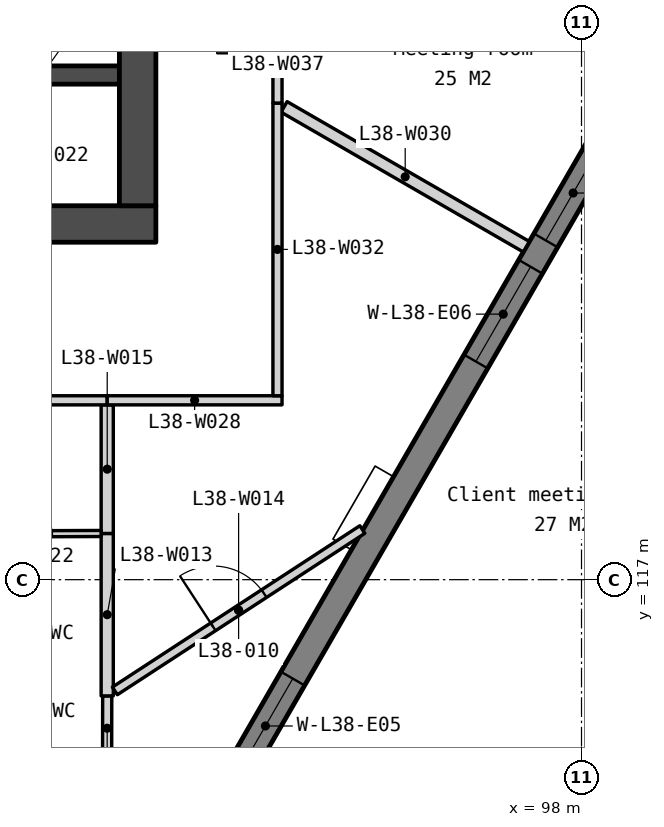
"""IFC4 building model, lengths in metres.
Left out: names, types, materials, properties, quantities, classifications, styles, units other than length and angle.
Written with IfcOpenShell. Run it as: python <this file> out.ifc"""

import sys

from ifc_helpers import new_model, si_unit, direction, frame, frame_2d, origin, place, context, subcontext, project, spatial, polyline, rectangle, outline, extrude, element, fill, save


model = new_model("IFC4")
c1 = context("Model", 3, precision=1e-05, world=origin(), true_north=direction((0.0, 1.0)))
c2 = subcontext(c1, "Body", "Model", "MODEL_VIEW")
j1 = project(units=[si_unit("LENGTHUNIT", "METRE"), si_unit("PLANEANGLEUNIT", "RADIAN")], contexts=[c1])
p1 = place(None, origin())
s1 = spatial("IfcSite", under=j1, at=p1, CompositionType="ELEMENT")
p2 = place(p1, origin())
s2 = spatial("IfcBuilding", under=s1, at=p2, CompositionType="ELEMENT")
p3 = place(p2, frame((0.0, 0.0, 152.0)))
s3 = spatial("IfcBuildingStorey", under=s2, at=p3, CompositionType="ELEMENT", Elevation=152.0)
p4 = place(p3, frame((69.0, 122.85, 0.0), z_axis=(0.0, 0.0, 1.0), x_axis=(1.0, 0.0, 0.0)))
e1 = element("IfcWall", 1, at=p4, inside=s3, PredefinedType="SOLIDWALL", context=c2, shape_type="SweptSolid", body=[
    extrude(rectangle(XDim=22.0, YDim=0.6, at=frame_2d((11.0, 0.0))), origin(), (0.0, 0.0, 1.0), 3.75),
])
p5 = place(p4, frame((16.375, 0.0, 0.0)))
e2 = element("IfcOpeningElement", 2, at=p5, cuts=e1, PredefinedType="OPENING", context=c2, shape_type="SweptSolid", body=[
    extrude(rectangle(XDim=1.8, YDim=2.1, at=frame_2d((0.9, 1.05))), frame((0.0, 0.31, 0.0), z_axis=(0.0, -1.0, 0.0), x_axis=(1.0, 0.0, 0.0)), (0.0, 0.0, 1.0), 0.62),
])
p6 = place(p4, frame((3.825, 0.0, 0.0)))
e3 = element("IfcOpeningElement", 3, at=p6, cuts=e1, PredefinedType="OPENING", context=c2, shape_type="SweptSolid", body=[
    extrude(rectangle(XDim=1.8, YDim=2.1, at=frame_2d((0.9, 1.05))), frame((0.0, 0.31, 0.0), z_axis=(0.0, -1.0, 0.0), x_axis=(1.0, 0.0, 0.0)), (0.0, 0.0, 1.0), 0.62),
])
p7 = place(p4, frame((12.85, 0.0, 0.0)))
e4 = element("IfcOpeningElement", 4, at=p7, cuts=e1, PredefinedType="OPENING", context=c2, shape_type="SweptSolid", body=[
    extrude(rectangle(XDim=1.5, YDim=2.1, at=frame_2d((0.75, 1.05))), frame((0.0, 0.31, 0.0), z_axis=(0.0, -1.0, 0.0), x_axis=(1.0, 0.0, 0.0)), (0.0, 0.0, 1.0), 0.62),
])
p8 = place(p3, frame((87.85, 125.3, 0.0), z_axis=(0.0, 0.0, 1.0), x_axis=(1.0, 0.0, 0.0)))
e5 = element("IfcWall", 5, at=p8, inside=s3, PredefinedType="SOLIDWALL", context=c2, shape_type="SweptSolid", body=[
    extrude(rectangle(XDim=2.55, YDim=0.3, at=frame_2d((1.275, 0.0))), origin(), (0.0, 0.0, 1.0), 3.75),
])
p9 = place(p3, frame((90.7, 133.95, 0.0), z_axis=(0.0, 0.0, 1.0), x_axis=(0.0, -1.0, 0.0)))
e6 = element("IfcWall", 6, at=p9, inside=s3, PredefinedType="SOLIDWALL", context=c2, shape_type="SweptSolid", body=[
    extrude(rectangle(XDim=10.8, YDim=0.6, at=frame_2d((5.4, 0.0))), origin(), (0.0, 0.0, 1.0), 3.75),
])
p10 = place(p3, frame((82.105, 96.067, -0.15), z_axis=(0.0, 0.0, 1.0), x_axis=(0.499997369791, 0.866026922331, 0.0)))
e7 = element("IfcWall", 7, at=p10, inside=s3, PredefinedType="SOLIDWALL", context=c2, shape_type="SweptSolid", body=[
    extrude(outline(polyline([(40.486, 0.0), (40.486, 3.9), (0.0, 3.9), (0.0, 0.0), (40.486, 0.0)])), frame((0.0, 0.225, 0.0), z_axis=(0.0, -1.0, 0.0), x_axis=(1.0, 0.0, 0.0)), (0.0, 0.0, 1.0), 0.45),
])
p11 = place(p10, frame((0.87, 0.0, 0.95)))
e8 = element("IfcOpeningElement", 8, at=p11, cuts=e7, PredefinedType="OPENING", context=c2, shape_type="SweptSolid", body=[
    extrude(rectangle(XDim=1.2, YDim=2.2, at=frame_2d((0.6, 1.1))), frame((0.0, 0.235, 0.0), z_axis=(0.0, -1.0, 0.0), x_axis=(1.0, 0.0, 0.0)), (0.0, 0.0, 1.0), 0.47),
])
p12 = place(p10, frame((8.072, 0.0, 0.95)))
e9 = element("IfcOpeningElement", 9, at=p12, cuts=e7, PredefinedType="OPENING", context=c2, shape_type="SweptSolid", body=[
    extrude(rectangle(XDim=1.8, YDim=2.2, at=frame_2d((0.9, 1.1))), frame((0.0, 0.235, 0.0), z_axis=(0.0, -1.0, 0.0), x_axis=(1.0, 0.0, 0.0)), (0.0, 0.0, 1.0), 0.47),
])
p13 = place(p10, frame((10.372, 0.0, 0.95)))
e10 = element("IfcOpeningElement", 10, at=p13, cuts=e7, PredefinedType="OPENING", context=c2, shape_type="SweptSolid", body=[
    extrude(rectangle(XDim=1.8, YDim=2.2, at=frame_2d((0.9, 1.1))), frame((0.0, 0.235, 0.0), z_axis=(0.0, -1.0, 0.0), x_axis=(1.0, 0.0, 0.0)), (0.0, 0.0, 1.0), 0.47),
])
p14 = place(p10, frame((18.193, 0.0, 0.95)))
e11 = element("IfcOpeningElement", 11, at=p14, cuts=e7, PredefinedType="OPENING", context=c2, shape_type="SweptSolid", body=[
    extrude(rectangle(XDim=1.8, YDim=2.2, at=frame_2d((0.9, 1.1))), frame((0.0, 0.235, 0.0), z_axis=(0.0, -1.0, 0.0), x_axis=(1.0, 0.0, 0.0)), (0.0, 0.0, 1.0), 0.47),
])
p15 = place(p10, frame((20.493, 0.0, 0.95)))
e12 = element("IfcOpeningElement", 12, at=p15, cuts=e7, PredefinedType="OPENING", context=c2, shape_type="SweptSolid", body=[
    extrude(rectangle(XDim=1.8, YDim=2.2, at=frame_2d((0.9, 1.1))), frame((0.0, 0.235, 0.0), z_axis=(0.0, -1.0, 0.0), x_axis=(1.0, 0.0, 0.0)), (0.0, 0.0, 1.0), 0.47),
])
p16 = place(p10, frame((28.315, 0.0, 0.95)))
e13 = element("IfcOpeningElement", 13, at=p16, cuts=e7, PredefinedType="OPENING", context=c2, shape_type="SweptSolid", body=[
    extrude(rectangle(XDim=1.8, YDim=2.2, at=frame_2d((0.9, 1.1))), frame((0.0, 0.235, 0.0), z_axis=(0.0, -1.0, 0.0), x_axis=(1.0, 0.0, 0.0)), (0.0, 0.0, 1.0), 0.47),
])
p17 = place(p10, frame((30.615, 0.0, 0.95)))
e14 = element("IfcOpeningElement", 14, at=p17, cuts=e7, PredefinedType="OPENING", context=c2, shape_type="SweptSolid", body=[
    extrude(rectangle(XDim=1.8, YDim=2.2, at=frame_2d((0.9, 1.1))), frame((0.0, 0.235, 0.0), z_axis=(0.0, -1.0, 0.0), x_axis=(1.0, 0.0, 0.0)), (0.0, 0.0, 1.0), 0.47),
])
p18 = place(p10, frame((38.417, 0.0, 0.95)))
e15 = element("IfcOpeningElement", 15, at=p18, cuts=e7, PredefinedType="OPENING", context=c2, shape_type="SweptSolid", body=[
    extrude(rectangle(XDim=1.2, YDim=2.2, at=frame_2d((0.6, 1.1))), frame((0.0, 0.235, 0.0), z_axis=(0.0, -1.0, 0.0), x_axis=(1.0, 0.0, 0.0)), (0.0, 0.0, 1.0), 0.47),
])
p19 = place(p3, frame((90.198, 114.025, 0.0), z_axis=(0.0, 0.0, 1.0), x_axis=(0.001606976805, 0.999998708812, 0.0)))
e16 = element("IfcWall", 16, at=p19, inside=s3, PredefinedType="PARTITIONING", context=c2, shape_type="SweptSolid", body=[
    extrude(rectangle(XDim=1.063, YDim=0.15, at=frame_2d((0.532, 0.0))), origin(), (0.0, 0.0, 1.0), 3.75),
])
p20 = place(p3, frame((90.2, 115.088, 0.0), z_axis=(0.0, 0.0, 1.0), x_axis=(0.0, 1.0, 0.0)))
e17 = element("IfcWall", 17, at=p20, inside=s3, PredefinedType="PARTITIONING", context=c2, shape_type="SweptSolid", body=[
    extrude(rectangle(XDim=2.672, YDim=0.2, at=frame_2d((1.336, 0.0))), origin(), (0.0, 0.0, 1.0), 3.75),
])
p21 = place(p3, frame((90.326, 115.17, 0.0), z_axis=(0.0, 0.0, 1.0), x_axis=(0.837619592687, 0.546253986665, 0.0)))
e18 = element("IfcWall", 18, at=p21, inside=s3, PredefinedType="PARTITIONING", context=c2, shape_type="SweptSolid", body=[
    extrude(rectangle(XDim=4.859, YDim=0.15, at=frame_2d((2.43, 0.0))), origin(), (0.0, 0.0, 1.0), 3.75),
])
p22 = place(p21, frame((1.93, 0.0, 0.0)))
e19 = element("IfcOpeningElement", 19, at=p22, cuts=e18, PredefinedType="OPENING", context=c2, shape_type="SweptSolid", body=[
    extrude(rectangle(XDim=1.0, YDim=2.1, at=frame_2d((0.5, 1.05))), frame((0.0, 0.085, 0.0), z_axis=(0.0, -1.0, 0.0), x_axis=(1.0, 0.0, 0.0)), (0.0, 0.0, 1.0), 0.17),
])
p23 = place(p3, frame((90.2, 117.76, 0.0), z_axis=(0.0, 0.0, 1.0), x_axis=(0.0, 1.0, 0.0)))
e20 = element("IfcWall", 20, at=p23, inside=s3, PredefinedType="PARTITIONING", context=c2, shape_type="SweptSolid", body=[
    extrude(rectangle(XDim=2.115, YDim=0.2, at=frame_2d((1.058, 0.0))), origin(), (0.0, 0.0, 1.0), 3.75),
])
p24 = place(p3, frame((87.68, 117.75, 0.0), z_axis=(0.0, 0.0, 1.0), x_axis=(0.999992261016, 0.003934197335, 0.0)))
e21 = element("IfcWall", 21, at=p24, inside=s3, PredefinedType="PARTITIONING", context=c2, shape_type="SweptSolid", body=[
    extrude(rectangle(XDim=2.42, YDim=0.1, at=frame_2d((1.21, 0.0))), origin(), (0.0, 0.0, 1.0), 3.75),
])
p25 = place(p24, frame((0.81, 0.0, 0.0)))
e22 = element("IfcOpeningElement", 22, at=p25, cuts=e21, PredefinedType="OPENING", context=c2, shape_type="SweptSolid", body=[
    extrude(rectangle(XDim=0.8, YDim=2.1, at=frame_2d((0.4, 1.05))), frame((0.0, 0.06, 0.0), z_axis=(0.0, -1.0, 0.0), x_axis=(1.0, 0.0, 0.0)), (0.0, 0.0, 1.0), 0.12),
])
p26 = place(p3, frame((81.275, 119.948, 0.0), z_axis=(0.0, 0.0, 1.0), x_axis=(0.999999976055, 0.000218836333, 0.0)))
e23 = element("IfcWall", 23, at=p26, inside=s3, PredefinedType="PARTITIONING", context=c2, shape_type="SweptSolid", body=[
    extrude(rectangle(XDim=8.925, YDim=0.15, at=frame_2d((4.462, 0.0))), origin(), (0.0, 0.0, 1.0), 3.75),
])
p27 = place(p26, frame((3.962, 0.0, 0.0)))
e24 = element("IfcOpeningElement", 24, at=p27, cuts=e23, PredefinedType="OPENING", context=c2, shape_type="SweptSolid", body=[
    extrude(rectangle(XDim=1.0, YDim=2.1, at=frame_2d((0.5, 1.05))), frame((0.0, 0.085, 0.0), z_axis=(0.0, -1.0, 0.0), x_axis=(1.0, 0.0, 0.0)), (0.0, 0.0, 1.0), 0.17),
])
p28 = place(p3, frame((90.2, 119.95, 0.0), z_axis=(0.0, 0.0, 1.0), x_axis=(1.0, 0.0, 0.0)))
e25 = element("IfcWall", 25, at=p28, inside=s3, PredefinedType="PARTITIONING", context=c2, shape_type="SweptSolid", body=[
    extrude(rectangle(XDim=2.875, YDim=0.15, at=frame_2d((1.438, 0.0))), origin(), (0.0, 0.0, 1.0), 3.75),
])
p29 = place(p3, frame((93.108, 124.776, 0.0), z_axis=(0.0, 0.0, 1.0), x_axis=(0.866033592927, -0.499985815721, 0.0)))
e26 = element("IfcWall", 26, at=p29, inside=s3, PredefinedType="PARTITIONING", context=c2, shape_type="SweptSolid", body=[
    extrude(rectangle(XDim=4.601, YDim=0.2, at=frame_2d((2.3, 0.0))), origin(), (0.0, 0.0, 1.0), 3.75),
])
p30 = place(p3, frame((93.0, 120.025, 0.0), z_axis=(0.0, 0.0, 1.0), x_axis=(0.0, 1.0, 0.0)))
e27 = element("IfcWall", 27, at=p30, inside=s3, PredefinedType="PARTITIONING", context=c2, shape_type="SweptSolid", body=[
    extrude(rectangle(XDim=4.814, YDim=0.15, at=frame_2d((2.407, 0.0))), origin(), (0.0, 0.0, 1.0), 3.75),
])
p31 = place(p3, frame((93.0, 124.839, 0.0), z_axis=(0.0, 0.0, 1.0), x_axis=(0.0, 1.0, 0.0)))
e28 = element("IfcWall", 28, at=p31, inside=s3, PredefinedType="PARTITIONING", context=c2, shape_type="SweptSolid", body=[
    extrude(rectangle(XDim=2.636, YDim=0.15, at=frame_2d((1.318, 0.0))), origin(), (0.0, 0.0, 1.0), 3.75),
])
p32 = place(p31, frame((0.818, 0.0, 0.0)))
e29 = element("IfcOpeningElement", 29, at=p32, cuts=e28, PredefinedType="OPENING", context=c2, shape_type="SweptSolid", body=[
    extrude(rectangle(XDim=1.0, YDim=2.1, at=frame_2d((0.5, 1.05))), frame((0.0, 0.085, 0.0), z_axis=(0.0, -1.0, 0.0), x_axis=(1.0, 0.0, 0.0)), (0.0, 0.0, 1.0), 0.17),
])
p33 = place(p15, origin())
e30 = element("IfcWindow", 30, at=p33, inside=s3, PartitioningType="SINGLE_PANEL", PredefinedType="WINDOW", context=c2, shape_type="SweptSolid", body=[
    extrude(rectangle(XDim=1.8, YDim=2.2, at=frame_2d((0.9, 1.1))), frame((0.0, 0.03, 0.0), z_axis=(0.0, -1.0, 0.0), x_axis=(1.0, 0.0, 0.0)), (0.0, 0.0, 1.0), 0.06),
])
fill(e12, e30)
p34 = place(p16, origin())
e31 = element("IfcWindow", 31, at=p34, inside=s3, PartitioningType="SINGLE_PANEL", PredefinedType="WINDOW", context=c2, shape_type="SweptSolid", body=[
    extrude(rectangle(XDim=1.8, YDim=2.2, at=frame_2d((0.9, 1.1))), frame((0.0, 0.03, 0.0), z_axis=(0.0, -1.0, 0.0), x_axis=(1.0, 0.0, 0.0)), (0.0, 0.0, 1.0), 0.06),
])
fill(e13, e31)
p35 = place(p17, origin())
e32 = element("IfcWindow", 32, at=p35, inside=s3, PartitioningType="SINGLE_PANEL", PredefinedType="WINDOW", context=c2, shape_type="SweptSolid", body=[
    extrude(rectangle(XDim=1.8, YDim=2.2, at=frame_2d((0.9, 1.1))), frame((0.0, 0.03, 0.0), z_axis=(0.0, -1.0, 0.0), x_axis=(1.0, 0.0, 0.0)), (0.0, 0.0, 1.0), 0.06),
])
fill(e14, e32)
p36 = place(p22, origin())
e33 = element("IfcDoor", 33, at=p36, inside=s3, OperationType="SINGLE_SWING_LEFT", PredefinedType="DOOR", context=c2, shape_type="SweptSolid", body=[
    extrude(rectangle(XDim=1.0, YDim=2.1, at=frame_2d((0.5, 1.05))), frame((0.0, 0.025, 0.0), z_axis=(0.0, -1.0, 0.0), x_axis=(1.0, 0.0, 0.0)), (0.0, 0.0, 1.0), 0.05),
])
fill(e19, e33)
p37 = place(p32, origin())
e34 = element("IfcDoor", 34, at=p37, inside=s3, OperationType="SINGLE_SWING_LEFT", PredefinedType="DOOR", context=c2, shape_type="SweptSolid", body=[
    extrude(rectangle(XDim=1.0, YDim=2.1, at=frame_2d((0.5, 1.05))), frame((0.0, 0.025, 0.0), z_axis=(0.0, -1.0, 0.0), x_axis=(1.0, 0.0, 0.0)), (0.0, 0.0, 1.0), 0.05),
])
fill(e29, e34)
save(model, sys.argv[1])
